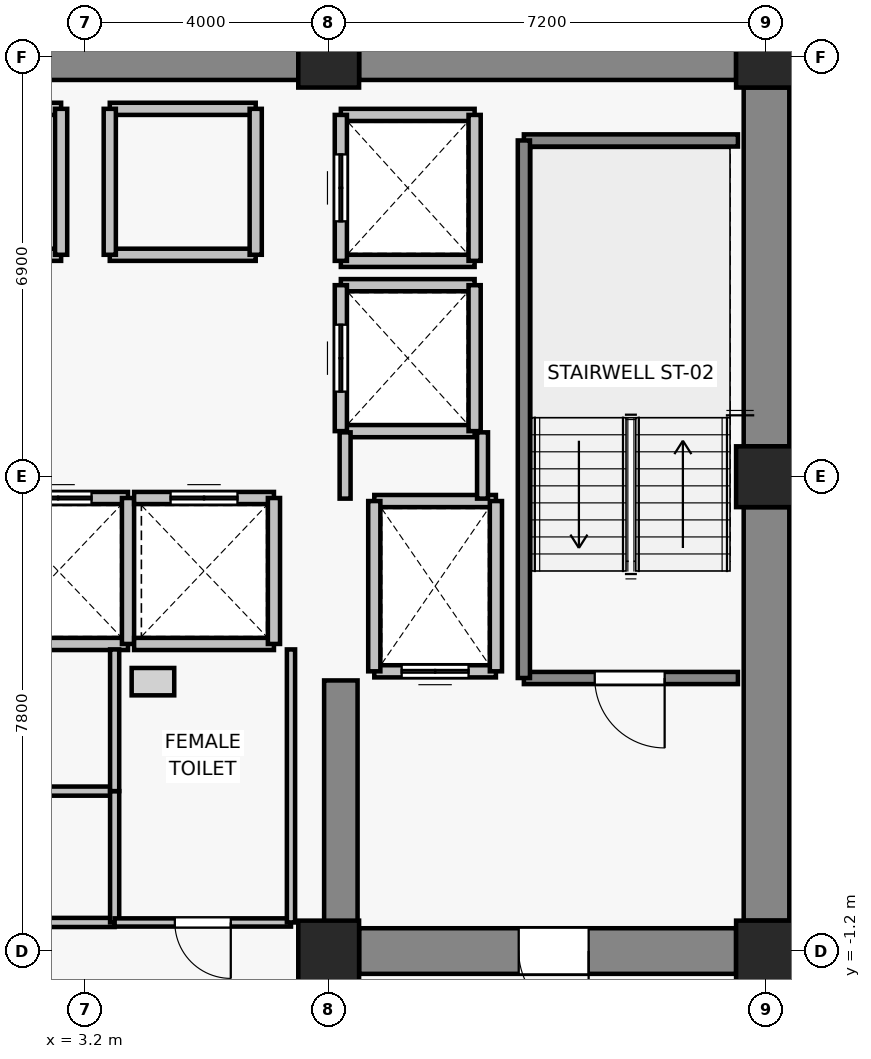
"""IFC4 building model, lengths in metres.
Left out: names, types, materials, properties, quantities, classifications, styles, units other than length and angle.
Written with IfcOpenShell. Run it as: python <this file> out.ifc"""

import sys

from ifc_helpers import new_model, si_unit, direction, frame, frame_2d, origin, origin_2d, place, context, subcontext, project, spatial, rectangle, extrude, source, transform, mapped, element, fill, save


model = new_model("IFC4")
c1 = context("Model", 3, precision=1e-05, world=origin(), true_north=direction((0.0, 1.0)))
c2 = subcontext(c1, "Body", "Model", "MODEL_VIEW")
j1 = project(units=[si_unit("LENGTHUNIT", "METRE"), si_unit("PLANEANGLEUNIT", "RADIAN")], contexts=[c1])
p1 = place(None, origin())
s1 = spatial("IfcSite", under=j1, at=p1, CompositionType="ELEMENT")
p2 = place(p1, origin())
s2 = spatial("IfcBuilding", under=s1, at=p2, CompositionType="ELEMENT")
p3 = place(p2, frame((0.0, 0.0, 86.8)))
s3 = spatial("IfcBuildingStorey", under=s2, at=p3, CompositionType="ELEMENT", Elevation=86.8)
for number, where, z_axis, x_axis in (
    (1, (7.2, -1.2, 0.0), (0.0, 0.0, 1.0), (1.0, 0.0, 0.0)),
    (2, (14.4, -1.2, 0.0), (0.0, 0.0, 1.0), (1.0, 0.0, 0.0)),
    (3, (14.4, 6.6, 0.0), (0.0, 0.0, 1.0), (1.0, 0.0, 0.0)),
    (4, (7.2, 13.5, 0.0), (0.0, 0.0, 1.0), (1.0, 0.0, 0.0)),
    (5, (14.4, 13.5, 0.0), (0.0, 0.0, 1.0), (1.0, 0.0, 0.0)),
):
    element("IfcColumn", number, at=place(p3, frame(where, z_axis=z_axis, x_axis=x_axis)), inside=s3, PredefinedType="COLUMN", context=c2, shape_type="SweptSolid", body=[
        extrude(rectangle(XDim=1.0, YDim=1.0, at=origin_2d()), origin(), (0.0, 0.0, 1.0), 3.3),
    ])
p4 = place(p3, frame((-6.7, 13.5, 0.0), z_axis=(0.0, 0.0, 1.0), x_axis=(1.0, 0.0, 0.0)))
e6 = element("IfcWall", 6, at=p4, inside=s3, PredefinedType="SHEAR", context=c2, shape_type="SweptSolid", body=[
    extrude(rectangle(XDim=13.4, YDim=0.75, at=frame_2d((6.7, 0.0))), origin(), (0.0, 0.0, 1.0), 3.075),
])
p5 = place(p3, frame((7.7, 13.5, 0.0), z_axis=(0.0, 0.0, 1.0), x_axis=(1.0, 0.0, 0.0)))
e7 = element("IfcWall", 7, at=p5, inside=s3, PredefinedType="SHEAR", context=c2, shape_type="SweptSolid", body=[
    extrude(rectangle(XDim=6.2, YDim=0.75, at=frame_2d((3.1, 0.0))), origin(), (0.0, 0.0, 1.0), 3.075),
])
p6 = place(p3, frame((14.4, -0.7, 0.0), z_axis=(0.0, 0.0, 1.0), x_axis=(0.0, 1.0, 0.0)))
e8 = element("IfcWall", 8, at=p6, inside=s3, PredefinedType="SHEAR", context=c2, shape_type="SweptSolid", body=[
    extrude(rectangle(XDim=6.8, YDim=0.75, at=frame_2d((3.4, 0.0))), origin(), (0.0, 0.0, 1.0), 3.075),
])
p7 = place(p3, frame((14.4, 7.1, 0.0), z_axis=(0.0, 0.0, 1.0), x_axis=(0.0, 1.0, 0.0)))
e9 = element("IfcWall", 9, at=p7, inside=s3, PredefinedType="SHEAR", context=c2, shape_type="SweptSolid", body=[
    extrude(rectangle(XDim=5.9, YDim=0.75, at=frame_2d((2.95, 0.0))), origin(), (0.0, 0.0, 1.0), 3.075),
])
p8 = place(p3, frame((13.9, -1.2, 0.0), z_axis=(0.0, 0.0, 1.0), x_axis=(-1.0, 0.0, 0.0)))
e10 = element("IfcWall", 10, at=p8, inside=s3, PredefinedType="SHEAR", context=c2, shape_type="SweptSolid", body=[
    extrude(rectangle(XDim=6.2, YDim=0.75, at=frame_2d((3.1, 0.0))), origin(), (0.0, 0.0, 1.0), 3.075),
])
p9 = place(p8, frame((2.425, 0.0, 0.0)))
e11 = element("IfcOpeningElement", 11, at=p9, cuts=e10, PredefinedType="OPENING", context=c2, shape_type="SweptSolid", body=[
    extrude(rectangle(XDim=1.15, YDim=2.15, at=frame_2d((0.575, 1.075))), frame((0.0, 0.385, 0.0), z_axis=(0.0, -1.0, 0.0), x_axis=(1.0, 0.0, 0.0)), (0.0, 0.0, 1.0), 0.77),
])
p10 = place(p3, frame((7.4, -0.825, 0.0), z_axis=(0.0, 0.0, 1.0), x_axis=(0.0, 1.0, 0.0)))
e12 = element("IfcWall", 12, at=p10, inside=s3, PredefinedType="SHEAR", context=c2, shape_type="SweptSolid", body=[
    extrude(rectangle(XDim=4.075, YDim=0.55, at=frame_2d((2.038, 0.0))), origin(), (0.0, 0.0, 1.0), 3.075),
])
p11 = place(p3, frame((9.95, 3.4, 0.0), z_axis=(0.0, 0.0, 1.0), x_axis=(-1.0, 0.0, 0.0)))
e13 = element("IfcWall", 13, at=p11, inside=s3, PredefinedType="SOLIDWALL", context=c2, shape_type="SweptSolid", body=[
    extrude(rectangle(XDim=2.0, YDim=0.2, at=frame_2d((1.0, 0.0))), origin(), (0.0, 0.0, 1.0), 3.075),
])
p12 = place(p11, frame((0.45, 0.0, 0.0)))
e14 = element("IfcOpeningElement", 14, at=p12, cuts=e13, PredefinedType="OPENING", context=c2, shape_type="SweptSolid", body=[
    extrude(rectangle(XDim=1.1, YDim=2.2, at=frame_2d((0.55, 1.1))), frame((0.0, 0.11, 0.0), z_axis=(0.0, -1.0, 0.0), x_axis=(1.0, 0.0, 0.0)), (0.0, 0.0, 1.0), 0.22),
])
p13 = place(p3, frame((7.95, 6.2, 0.0), z_axis=(0.0, 0.0, 1.0), x_axis=(1.0, 0.0, 0.0)))
e15 = element("IfcWall", 15, at=p13, inside=s3, PredefinedType="SOLIDWALL", context=c2, shape_type="SweptSolid", body=[
    extrude(rectangle(XDim=2.0, YDim=0.2, at=frame_2d((1.0, 0.0))), origin(), (0.0, 0.0, 1.0), 3.075),
])
for number, where, z_axis, x_axis in (
    (16, (7.95, 3.4, 0.0), (0.0, 0.0, 1.0), (0.0, 1.0, 0.0)),
    (17, (9.95, 6.2, 0.0), (0.0, 0.0, 1.0), (0.0, -1.0, 0.0)),
):
    element("IfcWall", number, at=place(p3, frame(where, z_axis=z_axis, x_axis=x_axis)), inside=s3, PredefinedType="SOLIDWALL", context=c2, shape_type="SweptSolid", body=[
        extrude(rectangle(XDim=2.8, YDim=0.2, at=frame_2d((1.4, 0.0))), origin(), (0.0, 0.0, 1.0), 3.075),
    ])
for number, where, z_axis, x_axis in (
    (18, (2.8, 10.25, 0.0), (0.0, 0.0, 1.0), (-1.0, 0.0, 0.0)),
    (19, (0.4, 12.65, 0.0), (0.0, 0.0, 1.0), (1.0, 0.0, 0.0)),
):
    element("IfcWall", number, at=place(p3, frame(where, z_axis=z_axis, x_axis=x_axis)), inside=s3, PredefinedType="SOLIDWALL", context=c2, shape_type="SweptSolid", body=[
        extrude(rectangle(XDim=2.4, YDim=0.2, at=frame_2d((1.2, 0.0))), origin(), (0.0, 0.0, 1.0), 3.075),
    ])
for number, where, z_axis, x_axis in (
    (20, (2.8, 12.65, 0.0), (0.0, 0.0, 1.0), (0.0, -1.0, 0.0)),
    (21, (6.0, 10.25, 0.0), (0.0, 0.0, 1.0), (-1.0, 0.0, 0.0)),
    (22, (3.6, 12.65, 0.0), (0.0, 0.0, 1.0), (1.0, 0.0, 0.0)),
    (23, (3.6, 10.25, 0.0), (0.0, 0.0, 1.0), (0.0, 1.0, 0.0)),
    (24, (6.0, 12.65, 0.0), (0.0, 0.0, 1.0), (0.0, -1.0, 0.0)),
):
    element("IfcWall", number, at=place(p3, frame(where, z_axis=z_axis, x_axis=x_axis)), inside=s3, PredefinedType="SOLIDWALL", context=c2, shape_type="SweptSolid", body=[
        extrude(rectangle(XDim=2.4, YDim=0.2, at=frame_2d((1.2, 0.0))), origin(), (0.0, 0.0, 1.0), 3.075),
    ])
p14 = place(p3, frame((3.9, 3.85, 0.0), z_axis=(0.0, 0.0, 1.0), x_axis=(-1.0, 0.0, 0.0)))
e25 = element("IfcWall", 25, at=p14, inside=s3, PredefinedType="SOLIDWALL", context=c2, shape_type="SweptSolid", body=[
    extrude(rectangle(XDim=2.3, YDim=0.2, at=frame_2d((1.15, 0.0))), origin(), (0.0, 0.0, 1.0), 3.075),
])
p15 = place(p3, frame((1.6, 6.25, 0.0), z_axis=(0.0, 0.0, 1.0), x_axis=(1.0, 0.0, 0.0)))
e26 = element("IfcWall", 26, at=p15, inside=s3, PredefinedType="SOLIDWALL", context=c2, shape_type="SweptSolid", body=[
    extrude(rectangle(XDim=2.3, YDim=0.2, at=frame_2d((1.15, 0.0))), origin(), (0.0, 0.0, 1.0), 3.075),
])
p16 = place(p15, frame((0.6, 0.0, 0.0)))
e27 = element("IfcOpeningElement", 27, at=p16, cuts=e26, PredefinedType="OPENING", context=c2, shape_type="SweptSolid", body=[
    extrude(rectangle(XDim=1.1, YDim=2.2, at=frame_2d((0.55, 1.1))), frame((0.0, 0.11, 0.0), z_axis=(0.0, -1.0, 0.0), x_axis=(1.0, 0.0, 0.0)), (0.0, 0.0, 1.0), 0.22),
])
p17 = place(p3, frame((3.9, 6.25, 0.0), z_axis=(0.0, 0.0, 1.0), x_axis=(0.0, -1.0, 0.0)))
e28 = element("IfcWall", 28, at=p17, inside=s3, PredefinedType="SOLIDWALL", context=c2, shape_type="SweptSolid", body=[
    extrude(rectangle(XDim=2.4, YDim=0.2, at=frame_2d((1.2, 0.0))), origin(), (0.0, 0.0, 1.0), 3.075),
])
p18 = place(p3, frame((6.3, 3.85, 0.0), z_axis=(0.0, 0.0, 1.0), x_axis=(-1.0, 0.0, 0.0)))
e29 = element("IfcWall", 29, at=p18, inside=s3, PredefinedType="SOLIDWALL", context=c2, shape_type="SweptSolid", body=[
    extrude(rectangle(XDim=2.3, YDim=0.2, at=frame_2d((1.15, 0.0))), origin(), (0.0, 0.0, 1.0), 3.075),
])
p19 = place(p3, frame((4.0, 6.25, 0.0), z_axis=(0.0, 0.0, 1.0), x_axis=(1.0, 0.0, 0.0)))
e30 = element("IfcWall", 30, at=p19, inside=s3, PredefinedType="SOLIDWALL", context=c2, shape_type="SweptSolid", body=[
    extrude(rectangle(XDim=2.3, YDim=0.2, at=frame_2d((1.15, 0.0))), origin(), (0.0, 0.0, 1.0), 3.075),
])
p20 = place(p19, frame((0.6, 0.0, 0.0)))
e31 = element("IfcOpeningElement", 31, at=p20, cuts=e30, PredefinedType="OPENING", context=c2, shape_type="SweptSolid", body=[
    extrude(rectangle(XDim=1.1, YDim=2.2, at=frame_2d((0.55, 1.1))), frame((0.0, 0.11, 0.0), z_axis=(0.0, -1.0, 0.0), x_axis=(1.0, 0.0, 0.0)), (0.0, 0.0, 1.0), 0.22),
])
p21 = place(p3, frame((6.3, 6.25, 0.0), z_axis=(0.0, 0.0, 1.0), x_axis=(0.0, -1.0, 0.0)))
e32 = element("IfcWall", 32, at=p21, inside=s3, PredefinedType="SOLIDWALL", context=c2, shape_type="SweptSolid", body=[
    extrude(rectangle(XDim=2.4, YDim=0.2, at=frame_2d((1.2, 0.0))), origin(), (0.0, 0.0, 1.0), 3.075),
])
for number, where, z_axis, x_axis in (
    (33, (9.6, 7.35, 0.0), (0.0, 0.0, 1.0), (-1.0, 0.0, 0.0)),
    (34, (7.4, 9.75, 0.0), (0.0, 0.0, 1.0), (1.0, 0.0, 0.0)),
):
    element("IfcWall", number, at=place(p3, frame(where, z_axis=z_axis, x_axis=x_axis)), inside=s3, PredefinedType="SOLIDWALL", context=c2, shape_type="SweptSolid", body=[
        extrude(rectangle(XDim=2.2, YDim=0.2, at=frame_2d((1.1, 0.0))), origin(), (0.0, 0.0, 1.0), 2.515),
    ])
p22 = place(p3, frame((7.4, 7.35, 0.0), z_axis=(0.0, 0.0, 1.0), x_axis=(0.0, 1.0, 0.0)))
e35 = element("IfcWall", 35, at=p22, inside=s3, PredefinedType="SOLIDWALL", context=c2, shape_type="SweptSolid", body=[
    extrude(rectangle(XDim=2.4, YDim=0.2, at=frame_2d((1.2, 0.0))), origin(), (0.0, 0.0, 1.0), 2.515),
])
p23 = place(p22, frame((0.65, 0.0, 0.0)))
e36 = element("IfcOpeningElement", 36, at=p23, cuts=e35, PredefinedType="OPENING", context=c2, shape_type="SweptSolid", body=[
    extrude(rectangle(XDim=1.1, YDim=2.2, at=frame_2d((0.55, 1.1))), frame((0.0, 0.11, 0.0), z_axis=(0.0, -1.0, 0.0), x_axis=(1.0, 0.0, 0.0)), (0.0, 0.0, 1.0), 0.22),
])
p24 = place(p3, frame((9.6, 9.75, 0.0), z_axis=(0.0, 0.0, 1.0), x_axis=(0.0, -1.0, 0.0)))
e37 = element("IfcWall", 37, at=p24, inside=s3, PredefinedType="SOLIDWALL", context=c2, shape_type="SweptSolid", body=[
    extrude(rectangle(XDim=2.4, YDim=0.2, at=frame_2d((1.2, 0.0))), origin(), (0.0, 0.0, 1.0), 3.075),
])
for number, where, z_axis, x_axis in (
    (38, (9.6, 10.15, 0.0), (0.0, 0.0, 1.0), (-1.0, 0.0, 0.0)),
    (39, (7.4, 12.55, 0.0), (0.0, 0.0, 1.0), (1.0, 0.0, 0.0)),
):
    element("IfcWall", number, at=place(p3, frame(where, z_axis=z_axis, x_axis=x_axis)), inside=s3, PredefinedType="SOLIDWALL", context=c2, shape_type="SweptSolid", body=[
        extrude(rectangle(XDim=2.2, YDim=0.2, at=frame_2d((1.1, 0.0))), origin(), (0.0, 0.0, 1.0), 2.515),
    ])
p25 = place(p3, frame((7.4, 10.15, 0.0), z_axis=(0.0, 0.0, 1.0), x_axis=(0.0, 1.0, 0.0)))
e40 = element("IfcWall", 40, at=p25, inside=s3, PredefinedType="SOLIDWALL", context=c2, shape_type="SweptSolid", body=[
    extrude(rectangle(XDim=2.4, YDim=0.2, at=frame_2d((1.2, 0.0))), origin(), (0.0, 0.0, 1.0), 2.515),
])
p26 = place(p25, frame((0.65, 0.0, 0.0)))
e41 = element("IfcOpeningElement", 41, at=p26, cuts=e40, PredefinedType="OPENING", context=c2, shape_type="SweptSolid", body=[
    extrude(rectangle(XDim=1.1, YDim=2.2, at=frame_2d((0.55, 1.1))), frame((0.0, 0.11, 0.0), z_axis=(0.0, -1.0, 0.0), x_axis=(1.0, 0.0, 0.0)), (0.0, 0.0, 1.0), 0.22),
])
p27 = place(p3, frame((9.6, 12.55, 0.0), z_axis=(0.0, 0.0, 1.0), x_axis=(0.0, -1.0, 0.0)))
e42 = element("IfcWall", 42, at=p27, inside=s3, PredefinedType="SOLIDWALL", context=c2, shape_type="SweptSolid", body=[
    extrude(rectangle(XDim=2.4, YDim=0.2, at=frame_2d((1.2, 0.0))), origin(), (0.0, 0.0, 1.0), 3.075),
])
p28 = place(p3, frame((13.93, 3.29, 0.0), z_axis=(0.0, 0.0, 1.0), x_axis=(-1.0, 0.0, 0.0)))
e43 = element("IfcWall", 43, at=p28, inside=s3, PredefinedType="SOLIDWALL", context=c2, shape_type="SweptSolid", body=[
    extrude(rectangle(XDim=3.52, YDim=0.2, at=frame_2d((1.76, 0.0))), origin(), (0.0, 0.0, 1.0), 3.075),
])
p29 = place(p28, frame((1.205, 0.0, 0.0)))
e44 = element("IfcOpeningElement", 44, at=p29, cuts=e43, PredefinedType="OPENING", context=c2, shape_type="SweptSolid", body=[
    extrude(rectangle(XDim=1.15, YDim=2.15, at=frame_2d((0.575, 1.075))), frame((0.0, 0.11, 0.0), z_axis=(0.0, -1.0, 0.0), x_axis=(1.0, 0.0, 0.0)), (0.0, 0.0, 1.0), 0.22),
])
p30 = place(p3, frame((10.41, 12.13, 0.0), z_axis=(0.0, 0.0, 1.0), x_axis=(1.0, 0.0, 0.0)))
e45 = element("IfcWall", 45, at=p30, inside=s3, PredefinedType="SOLIDWALL", context=c2, shape_type="SweptSolid", body=[
    extrude(rectangle(XDim=3.52, YDim=0.2, at=frame_2d((1.76, 0.0))), origin(), (0.0, 0.0, 1.0), 3.075),
])
p31 = place(p3, frame((10.41, 3.29, 0.0), z_axis=(0.0, 0.0, 1.0), x_axis=(0.0, 1.0, 0.0)))
e46 = element("IfcWall", 46, at=p31, inside=s3, PredefinedType="SOLIDWALL", context=c2, shape_type="SweptSolid", body=[
    extrude(rectangle(XDim=8.84, YDim=0.2, at=frame_2d((4.42, 0.0))), origin(), (0.0, 0.0, 1.0), 3.075),
])
p32 = place(p3, frame((7.47, 6.24, 0.0), z_axis=(0.0, 0.0, 1.0), x_axis=(0.0, 1.0, 0.0)))
e47 = element("IfcWall", 47, at=p32, inside=s3, PredefinedType="PARTITIONING", context=c2, shape_type="SweptSolid", body=[
    extrude(rectangle(XDim=1.09, YDim=0.18, at=frame_2d((0.545, 0.0))), origin(), (0.0, 0.0, 1.0), 2.515),
])
p33 = place(p3, frame((9.73, 7.33, 0.0), z_axis=(0.0, 0.0, 1.0), x_axis=(0.0, -1.0, 0.0)))
e48 = element("IfcWall", 48, at=p33, inside=s3, PredefinedType="PARTITIONING", context=c2, shape_type="SweptSolid", body=[
    extrude(rectangle(XDim=1.09, YDim=0.18, at=frame_2d((0.545, 0.0))), origin(), (0.0, 0.0, 1.0), 3.075),
])
for number, where, z_axis, x_axis in (
    (49, (3.68, -0.73, 0.0), (0.0, 0.0, 1.0), (-1.0, 0.0, 0.0)),
    (50, (1.47, 1.43, 0.0), (0.0, 0.0, 1.0), (1.0, 0.0, 0.0)),
):
    element("IfcWall", number, at=place(p3, frame(where, z_axis=z_axis, x_axis=x_axis)), inside=s3, PredefinedType="PARTITIONING", context=c2, shape_type="SweptSolid", body=[
        extrude(rectangle(XDim=2.21, YDim=0.15, at=frame_2d((1.105, 0.0))), origin(), (0.0, 0.0, 1.0), 3.075),
    ])
p34 = place(p3, frame((3.68, 1.43, 0.0), z_axis=(0.0, 0.0, 1.0), x_axis=(0.0, -1.0, 0.0)))
e51 = element("IfcWall", 51, at=p34, inside=s3, PredefinedType="PARTITIONING", context=c2, shape_type="SweptSolid", body=[
    extrude(rectangle(XDim=2.16, YDim=0.15, at=frame_2d((1.08, 0.0))), origin(), (0.0, 0.0, 1.0), 3.075),
])
p35 = place(p3, frame((3.68, 3.76, 0.0), z_axis=(0.0, 0.0, 1.0), x_axis=(0.0, -1.0, 0.0)))
e52 = element("IfcWall", 52, at=p35, inside=s3, PredefinedType="PARTITIONING", context=c2, shape_type="SweptSolid", body=[
    extrude(rectangle(XDim=2.33, YDim=0.15, at=frame_2d((1.165, 0.0))), origin(), (0.0, 0.0, 1.0), 3.075),
])
p36 = place(p3, frame((6.58, -0.73, 0.0), z_axis=(0.0, 0.0, 1.0), x_axis=(-1.0, 0.0, 0.0)))
e53 = element("IfcWall", 53, at=p36, inside=s3, PredefinedType="PARTITIONING", context=c2, shape_type="SweptSolid", body=[
    extrude(rectangle(XDim=2.9, YDim=0.135, at=frame_2d((1.45, 0.0))), origin(), (0.0, 0.0, 1.0), 3.075),
])
p37 = place(p36, frame((0.99, 0.0, 0.0)))
e54 = element("IfcOpeningElement", 54, at=p37, cuts=e53, PredefinedType="OPENING", context=c2, shape_type="SweptSolid", body=[
    extrude(rectangle(XDim=0.92, YDim=2.1, at=frame_2d((0.46, 1.05))), frame((0.0, 0.077, 0.0), z_axis=(0.0, -1.0, 0.0), x_axis=(1.0, 0.0, 0.0)), (0.0, 0.0, 1.0), 0.155),
])
p38 = place(p3, frame((6.58, 3.76, 0.0), z_axis=(0.0, 0.0, 1.0), x_axis=(0.0, -1.0, 0.0)))
e55 = element("IfcWall", 55, at=p38, inside=s3, PredefinedType="PARTITIONING", context=c2, shape_type="SweptSolid", body=[
    extrude(rectangle(XDim=4.49, YDim=0.135, at=frame_2d((2.245, 0.0))), origin(), (0.0, 0.0, 1.0), 3.075),
])
m1 = source(origin(), c2, "Body", "SweptSolid", [
    extrude(rectangle(XDim=1.1, YDim=2.2, at=frame_2d((0.55, 1.1))), frame((0.0, 0.025, 0.0), z_axis=(0.0, -1.0, 0.0), x_axis=(1.0, 0.0, 0.0)), (0.0, 0.0, 1.0), 0.05),
])
p39 = place(p12, origin())
e56 = element("IfcDoor", 56, at=p39, inside=s3, OperationType="DOUBLE_DOOR_SLIDING", PredefinedType="DOOR", context=c2, shape_type="MappedRepresentation", body=[
    mapped(m1, transform((0.0, 0.0, 0.0), x_axis=(1.0, 0.0, 0.0), y_axis=(0.0, 1.0, 0.0), z_axis=(0.0, 0.0, 1.0), scale=1.0)),
])
fill(e14, e56)
p40 = place(p16, origin())
e57 = element("IfcDoor", 57, at=p40, inside=s3, OperationType="DOUBLE_DOOR_SLIDING", PredefinedType="DOOR", context=c2, shape_type="MappedRepresentation", body=[
    mapped(m1, transform((0.0, 0.0, 0.0), x_axis=(1.0, 0.0, 0.0), y_axis=(0.0, 1.0, 0.0), z_axis=(0.0, 0.0, 1.0), scale=1.0)),
])
fill(e27, e57)
p41 = place(p20, origin())
e58 = element("IfcDoor", 58, at=p41, inside=s3, OperationType="DOUBLE_DOOR_SLIDING", PredefinedType="DOOR", context=c2, shape_type="MappedRepresentation", body=[
    mapped(m1, transform((0.0, 0.0, 0.0), x_axis=(1.0, 0.0, 0.0), y_axis=(0.0, 1.0, 0.0), z_axis=(0.0, 0.0, 1.0), scale=1.0)),
])
fill(e31, e58)
p42 = place(p23, origin())
e59 = element("IfcDoor", 59, at=p42, inside=s3, OperationType="DOUBLE_DOOR_SLIDING", PredefinedType="DOOR", context=c2, shape_type="MappedRepresentation", body=[
    mapped(m1, transform((0.0, 0.0, 0.0), x_axis=(1.0, 0.0, 0.0), y_axis=(0.0, 1.0, 0.0), z_axis=(0.0, 0.0, 1.0), scale=1.0)),
])
fill(e36, e59)
p43 = place(p26, origin())
e60 = element("IfcDoor", 60, at=p43, inside=s3, OperationType="DOUBLE_DOOR_SLIDING", PredefinedType="DOOR", context=c2, shape_type="MappedRepresentation", body=[
    mapped(m1, transform((0.0, 0.0, 0.0), x_axis=(1.0, 0.0, 0.0), y_axis=(0.0, 1.0, 0.0), z_axis=(0.0, 0.0, 1.0), scale=1.0)),
])
fill(e41, e60)
m2 = source(origin(), c2, "Body", "SweptSolid", [
    extrude(rectangle(XDim=1.15, YDim=2.15, at=frame_2d((0.575, 1.075))), frame((0.0, 0.025, 0.0), z_axis=(0.0, -1.0, 0.0), x_axis=(1.0, 0.0, 0.0)), (0.0, 0.0, 1.0), 0.05),
])
p44 = place(p29, origin())
e61 = element("IfcDoor", 61, at=p44, inside=s3, OperationType="SINGLE_SWING_LEFT", PredefinedType="DOOR", context=c2, shape_type="MappedRepresentation", body=[
    mapped(m2, transform((0.0, 0.0, 0.0), x_axis=(1.0, 0.0, 0.0), y_axis=(0.0, 1.0, 0.0), z_axis=(0.0, 0.0, 1.0), scale=1.0)),
])
fill(e44, e61)
p45 = place(p9, origin())
e62 = element("IfcDoor", 62, at=p45, inside=s3, OperationType="SINGLE_SWING_LEFT", PredefinedType="DOOR", context=c2, shape_type="MappedRepresentation", body=[
    mapped(m2, transform((0.0, 0.0, 0.0), x_axis=(1.0, 0.0, 0.0), y_axis=(0.0, 1.0, 0.0), z_axis=(0.0, 0.0, 1.0), scale=1.0)),
])
fill(e11, e62)
m3 = source(origin(), c2, "Body", "SweptSolid", [
    extrude(rectangle(XDim=0.92, YDim=2.1, at=frame_2d((0.46, 1.05))), frame((0.0, 0.025, 0.0), z_axis=(0.0, -1.0, 0.0), x_axis=(1.0, 0.0, 0.0)), (0.0, 0.0, 1.0), 0.05),
])
p46 = place(p37, origin())
e63 = element("IfcDoor", 63, at=p46, inside=s3, OperationType="SINGLE_SWING_LEFT", PredefinedType="DOOR", context=c2, shape_type="MappedRepresentation", body=[
    mapped(m3, transform((0.0, 0.0, 0.0), x_axis=(1.0, 0.0, 0.0), y_axis=(0.0, 1.0, 0.0), z_axis=(0.0, 0.0, 1.0), scale=1.0)),
])
fill(e54, e63)
save(model, sys.argv[1])
